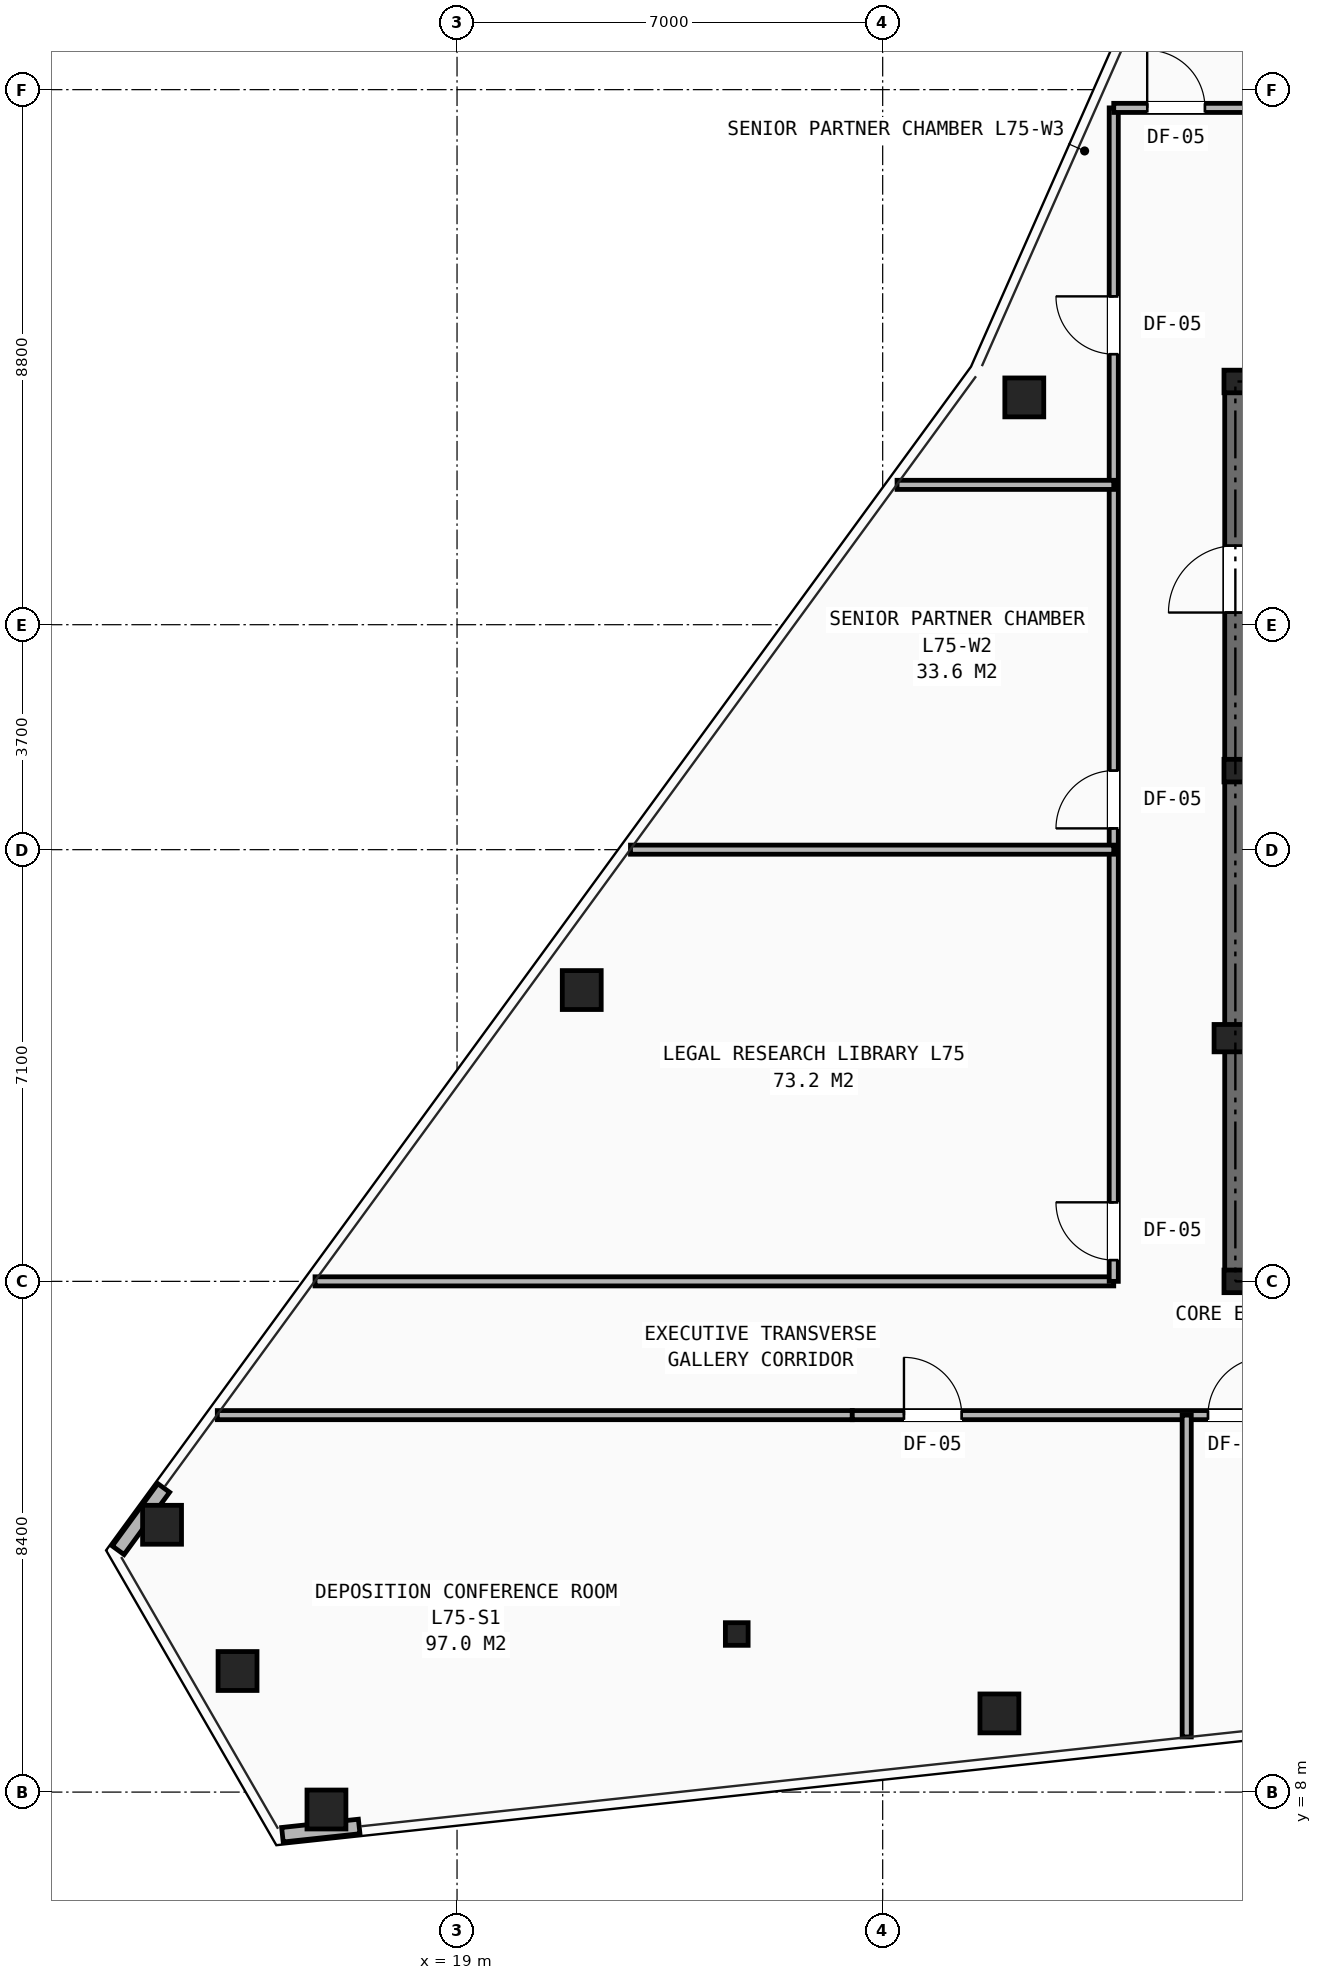
"""IFC4 building model, lengths in metres.
Left out: names, types, materials, properties, quantities, classifications, styles, units other than length and angle.
Written with IfcOpenShell. Run it as: python <this file> out.ifc"""

import sys

from ifc_helpers import new_model, si_unit, direction, frame, frame_2d, origin, origin_2d, place, context, subcontext, project, spatial, rectangle, hollow_rectangle, i_section, extrude, element, fill, save


model = new_model("IFC4")
c1 = context("Model", 3, precision=1e-05, world=origin(), true_north=direction((0.0, 1.0)))
c2 = subcontext(c1, "Body", "Model", "MODEL_VIEW")
j1 = project(units=[si_unit("LENGTHUNIT", "METRE"), si_unit("PLANEANGLEUNIT", "RADIAN")], contexts=[c1])
p1 = place(None, origin())
s1 = spatial("IfcSite", under=j1, at=p1, CompositionType="ELEMENT")
p2 = place(p1, origin())
s2 = spatial("IfcBuilding", under=s1, at=p2, CompositionType="ELEMENT")
p3 = place(p2, frame((0.0, 0.0, 265.5)))
s3 = spatial("IfcBuildingStorey", under=s2, at=p3, CompositionType="ELEMENT", Elevation=265.5)
for number, where, z_axis, x_axis in (
    (1, (31.8, 16.4, 0.0), (0.0, 0.0, 1.0), (1.0, 0.0, 0.0)),
    (2, (31.8, 24.8, 0.0), (0.0, 0.0, 1.0), (1.0, 0.0, 0.0)),
    (3, (31.8, 31.2, 0.0), (0.0, 0.0, 1.0), (1.0, 0.0, 0.0)),
    (4, (23.6, 10.6, 0.0), (0.0, 0.0, 1.0), (1.0, 0.0, 0.0)),
):
    element("IfcColumn", number, at=place(p3, frame(where, z_axis=z_axis, x_axis=x_axis)), inside=s3, PredefinedType="COLUMN", context=c2, shape_type="SweptSolid", body=[
        extrude(i_section(OverallWidth=0.374, OverallDepth=0.372, WebThickness=0.016, FlangeThickness=0.026, at=origin_2d()), origin(), (0.0, 0.0, 1.0), 3.5),
    ])
p4 = place(p3, frame((31.8, 20.4, 0.0), z_axis=(0.0, 0.0, 1.0), x_axis=(1.0, 0.0, 0.0)))
e5 = element("IfcColumn", 5, at=p4, inside=s3, PredefinedType="PILASTER", context=c2, shape_type="SweptSolid", body=[
    extrude(rectangle(XDim=0.7, YDim=0.45, at=origin_2d()), origin(), (0.0, 0.0, 1.0), 3.5),
])
for number, where, z_axis, x_axis in (
    (6, (28.329, 30.938, 0.0), (0.0, 0.0, 1.0), (1.0, 0.0, 0.0)),
    (7, (21.051, 21.191, 0.0), (0.0, 0.0, 1.0), (1.0, 0.0, 0.0)),
    (8, (14.149, 12.397, 0.0), (0.0, 0.0, 1.0), (1.0, 0.0, 0.0)),
    (9, (15.39, 9.991, 0.0), (0.0, 0.0, 1.0), (1.0, 0.0, 0.0)),
    (10, (16.852, 7.714, 0.0), (0.0, 0.0, 1.0), (1.0, 0.0, 0.0)),
    (11, (27.92, 9.294, 0.0), (0.0, 0.0, 1.0), (1.0, 0.0, 0.0)),
):
    element("IfcColumn", number, at=place(p3, frame(where, z_axis=z_axis, x_axis=x_axis)), inside=s3, PredefinedType="COLUMN", context=c2, shape_type="SweptSolid", body=[
        extrude(hollow_rectangle(XDim=0.64, YDim=0.64, WallThickness=0.045, at=origin_2d()), origin(), (0.0, 0.0, 1.0), 3.5),
    ])
for number, where, z_axis, x_axis in (
    (12, (14.176, 13.002, 0.0), (0.0, 0.0, 1.0), (-0.59, -0.807, 0.0)),
    (13, (16.128, 7.298, 0.0), (0.0, 0.0, 1.0), (0.994, 0.107, 0.0)),
):
    element("IfcWall", number, at=place(p3, frame(where, z_axis=z_axis, x_axis=x_axis)), inside=s3, PredefinedType="SHEAR", context=c2, shape_type="SweptSolid", body=[
        extrude(rectangle(XDim=1.269, YDim=0.24, at=frame_2d((0.635, 0.0))), origin(), (0.0, 0.0, 1.0), 2.623),
    ])
p5 = place(p3, frame((31.8, 16.4, 0.0), z_axis=(0.0, 0.0, 1.0), x_axis=(1.0, 0.0, 0.0)))
e14 = element("IfcWall", 14, at=p5, inside=s3, PredefinedType="SHEAR", context=c2, shape_type="SweptSolid", body=[
    extrude(rectangle(XDim=16.4, YDim=0.35, at=frame_2d((8.2, 0.0))), origin(), (0.0, 0.0, 1.0), 3.25),
])
p6 = place(p5, frame((4.2, 0.0, 0.0)))
e15 = element("IfcOpeningElement", 15, at=p6, cuts=e14, PredefinedType="OPENING", context=c2, shape_type="SweptSolid", body=[
    extrude(rectangle(XDim=0.95, YDim=2.1, at=frame_2d((0.475, 1.05))), frame((0.0, 0.185, 0.0), z_axis=(0.0, -1.0, 0.0), x_axis=(1.0, 0.0, 0.0)), (0.0, 0.0, 1.0), 0.37),
])
p7 = place(p5, frame((10.6, 0.0, 0.0)))
e16 = element("IfcOpeningElement", 16, at=p7, cuts=e14, PredefinedType="OPENING", context=c2, shape_type="SweptSolid", body=[
    extrude(rectangle(XDim=0.95, YDim=2.1, at=frame_2d((0.475, 1.05))), frame((0.0, 0.185, 0.0), z_axis=(0.0, -1.0, 0.0), x_axis=(1.0, 0.0, 0.0)), (0.0, 0.0, 1.0), 0.37),
])
p8 = place(p3, frame((31.8, 31.2, 0.0), z_axis=(0.0, 0.0, 1.0), x_axis=(1.0, 0.0, 0.0)))
e17 = element("IfcWall", 17, at=p8, inside=s3, PredefinedType="SHEAR", context=c2, shape_type="SweptSolid", body=[
    extrude(rectangle(XDim=16.4, YDim=0.35, at=frame_2d((8.2, 0.0))), origin(), (0.0, 0.0, 1.0), 3.25),
])
p9 = place(p3, frame((31.8, 16.4, 0.0), z_axis=(0.0, 0.0, 1.0), x_axis=(0.0, 1.0, 0.0)))
e18 = element("IfcWall", 18, at=p9, inside=s3, PredefinedType="SHEAR", context=c2, shape_type="SweptSolid", body=[
    extrude(rectangle(XDim=14.8, YDim=0.35, at=frame_2d((7.4, 0.0))), origin(), (0.0, 0.0, 1.0), 3.25),
])
p10 = place(p9, frame((11.0, 0.0, 0.0)))
e19 = element("IfcOpeningElement", 19, at=p10, cuts=e18, PredefinedType="OPENING", context=c2, shape_type="SweptSolid", body=[
    extrude(rectangle(XDim=1.1, YDim=2.15, at=frame_2d((0.55, 1.075))), frame((0.0, 0.185, 0.0), z_axis=(0.0, -1.0, 0.0), x_axis=(1.0, 0.0, 0.0)), (0.0, 0.0, 1.0), 0.37),
])
p11 = place(p3, frame((31.8, 24.755, 0.0), z_axis=(0.0, 0.0, 1.0), x_axis=(1.0, 0.0, 0.0)))
e20 = element("IfcWall", 20, at=p11, inside=s3, PredefinedType="SHEAR", context=c2, shape_type="SweptSolid", body=[
    extrude(rectangle(XDim=3.245, YDim=0.25, at=frame_2d((1.623, 0.0))), origin(), (0.0, 0.0, 1.0), 3.25),
])
p12 = place(p3, frame((15.057, 14.2, 0.0), z_axis=(0.0, 0.0, 1.0), x_axis=(1.0, 0.0, 0.0)))
e21 = element("IfcWall", 21, at=p12, inside=s3, PredefinedType="PARTITIONING", context=c2, shape_type="SweptSolid", body=[
    extrude(rectangle(XDim=10.443, YDim=0.15, at=frame_2d((5.221, 0.0))), origin(), (0.0, 0.0, 1.0), 2.292),
])
p13 = place(p3, frame((16.665, 16.4, 0.0), z_axis=(0.0, 0.0, 1.0), x_axis=(1.0, 0.0, 0.0)))
e22 = element("IfcWall", 22, at=p13, inside=s3, PredefinedType="PARTITIONING", context=c2, shape_type="SweptSolid", body=[
    extrude(rectangle(XDim=13.135, YDim=0.15, at=frame_2d((6.568, 0.0))), origin(), (0.0, 0.0, 1.0), 2.292),
])
p14 = place(p3, frame((29.8, 16.4, 0.0), z_axis=(0.0, 0.0, 1.0), x_axis=(0.0, 1.0, 0.0)))
e23 = element("IfcWall", 23, at=p14, inside=s3, PredefinedType="PARTITIONING", context=c2, shape_type="SweptSolid", body=[
    extrude(rectangle(XDim=19.3, YDim=0.15, at=frame_2d((9.65, 0.0))), origin(), (0.0, 0.0, 1.0), 2.292),
])
p15 = place(p14, frame((0.35, 0.0, 0.0)))
e24 = element("IfcOpeningElement", 24, at=p15, cuts=e23, PredefinedType="OPENING", context=c2, shape_type="SweptSolid", body=[
    extrude(rectangle(XDim=0.95, YDim=2.1, at=frame_2d((0.475, 1.05))), frame((0.0, 0.085, 0.0), z_axis=(0.0, -1.0, 0.0), x_axis=(1.0, 0.0, 0.0)), (0.0, 0.0, 1.0), 0.17),
])
p16 = place(p14, frame((7.45, 0.0, 0.0)))
e25 = element("IfcOpeningElement", 25, at=p16, cuts=e23, PredefinedType="OPENING", context=c2, shape_type="SweptSolid", body=[
    extrude(rectangle(XDim=0.95, YDim=2.1, at=frame_2d((0.475, 1.05))), frame((0.0, 0.085, 0.0), z_axis=(0.0, -1.0, 0.0), x_axis=(1.0, 0.0, 0.0)), (0.0, 0.0, 1.0), 0.17),
])
p17 = place(p14, frame((15.25, 0.0, 0.0)))
e26 = element("IfcOpeningElement", 26, at=p17, cuts=e23, PredefinedType="OPENING", context=c2, shape_type="SweptSolid", body=[
    extrude(rectangle(XDim=0.95, YDim=2.1, at=frame_2d((0.475, 1.05))), frame((0.0, 0.085, 0.0), z_axis=(0.0, -1.0, 0.0), x_axis=(1.0, 0.0, 0.0)), (0.0, 0.0, 1.0), 0.17),
])
p18 = place(p3, frame((29.8, 35.7, 0.0), z_axis=(0.0, 0.0, 1.0), x_axis=(1.0, 0.0, 0.0)))
e27 = element("IfcWall", 27, at=p18, inside=s3, PredefinedType="PARTITIONING", context=c2, shape_type="SweptSolid", body=[
    extrude(rectangle(XDim=9.45, YDim=0.15, at=frame_2d((4.725, 0.0))), origin(), (0.0, 0.0, 1.0), 2.628),
])
p19 = place(p18, frame((0.55, 0.0, 0.0)))
e28 = element("IfcOpeningElement", 28, at=p19, cuts=e27, PredefinedType="OPENING", context=c2, shape_type="SweptSolid", body=[
    extrude(rectangle(XDim=0.95, YDim=2.1, at=frame_2d((0.475, 1.05))), frame((0.0, 0.085, 0.0), z_axis=(0.0, -1.0, 0.0), x_axis=(1.0, 0.0, 0.0)), (0.0, 0.0, 1.0), 0.17),
])
p20 = place(p18, frame((5.35, 0.0, 0.0)))
e29 = element("IfcOpeningElement", 29, at=p20, cuts=e27, PredefinedType="OPENING", context=c2, shape_type="SweptSolid", body=[
    extrude(rectangle(XDim=0.95, YDim=2.1, at=frame_2d((0.475, 1.05))), frame((0.0, 0.085, 0.0), z_axis=(0.0, -1.0, 0.0), x_axis=(1.0, 0.0, 0.0)), (0.0, 0.0, 1.0), 0.17),
])
p21 = place(p3, frame((25.5, 14.2, 0.0), z_axis=(0.0, 0.0, 1.0), x_axis=(1.0, 0.0, 0.0)))
e30 = element("IfcWall", 30, at=p21, inside=s3, PredefinedType="PARTITIONING", context=c2, shape_type="SweptSolid", body=[
    extrude(rectangle(XDim=29.0, YDim=0.15, at=frame_2d((14.5, 0.0))), origin(), (0.0, 0.0, 1.0), 2.292),
])
p22 = place(p21, frame((0.85, 0.0, 0.0)))
e31 = element("IfcOpeningElement", 31, at=p22, cuts=e30, PredefinedType="OPENING", context=c2, shape_type="SweptSolid", body=[
    extrude(rectangle(XDim=0.95, YDim=2.1, at=frame_2d((0.475, 1.05))), frame((0.0, 0.085, 0.0), z_axis=(0.0, -1.0, 0.0), x_axis=(1.0, 0.0, 0.0)), (0.0, 0.0, 1.0), 0.17),
])
p23 = place(p21, frame((5.85, 0.0, 0.0)))
e32 = element("IfcOpeningElement", 32, at=p23, cuts=e30, PredefinedType="OPENING", context=c2, shape_type="SweptSolid", body=[
    extrude(rectangle(XDim=0.95, YDim=2.1, at=frame_2d((0.475, 1.05))), frame((0.0, 0.085, 0.0), z_axis=(0.0, -1.0, 0.0), x_axis=(1.0, 0.0, 0.0)), (0.0, 0.0, 1.0), 0.17),
])
p24 = place(p21, frame((23.85, 0.0, 0.0)))
e33 = element("IfcOpeningElement", 33, at=p24, cuts=e30, PredefinedType="OPENING", context=c2, shape_type="SweptSolid", body=[
    extrude(rectangle(XDim=0.95, YDim=2.1, at=frame_2d((0.475, 1.05))), frame((0.0, 0.085, 0.0), z_axis=(0.0, -1.0, 0.0), x_axis=(1.0, 0.0, 0.0)), (0.0, 0.0, 1.0), 0.17),
])
p25 = place(p3, frame((31.0, 8.907, 0.0), z_axis=(0.0, 0.0, 1.0), x_axis=(0.0, 1.0, 0.0)))
e34 = element("IfcWall", 34, at=p25, inside=s3, PredefinedType="PARTITIONING", context=c2, shape_type="SweptSolid", body=[
    extrude(rectangle(XDim=5.293, YDim=0.15, at=frame_2d((2.646, 0.0))), origin(), (0.0, 0.0, 1.0), 2.628),
])
p26 = place(p3, frame((21.852, 23.5, 0.0), z_axis=(0.0, 0.0, 1.0), x_axis=(1.0, 0.0, 0.0)))
e35 = element("IfcWall", 35, at=p26, inside=s3, PredefinedType="PARTITIONING", context=c2, shape_type="SweptSolid", body=[
    extrude(rectangle(XDim=7.948, YDim=0.15, at=frame_2d((3.974, 0.0))), origin(), (0.0, 0.0, 1.0), 2.628),
])
p27 = place(p3, frame((26.236, 29.5, 0.0), z_axis=(0.0, 0.0, 1.0), x_axis=(1.0, 0.0, 0.0)))
e36 = element("IfcWall", 36, at=p27, inside=s3, PredefinedType="PARTITIONING", context=c2, shape_type="SweptSolid", body=[
    extrude(rectangle(XDim=3.564, YDim=0.15, at=frame_2d((1.782, 0.0))), origin(), (0.0, 0.0, 1.0), 2.628),
])
p28 = place(p10, origin())
e37 = element("IfcDoor", 37, at=p28, inside=s3, OperationType="SINGLE_SWING_LEFT", PredefinedType="DOOR", context=c2, shape_type="SweptSolid", body=[
    extrude(rectangle(XDim=1.1, YDim=2.15, at=frame_2d((0.55, 1.075))), frame((0.0, 0.025, 0.0), z_axis=(0.0, -1.0, 0.0), x_axis=(1.0, 0.0, 0.0)), (0.0, 0.0, 1.0), 0.05),
])
fill(e19, e37)
p29 = place(p22, origin())
e38 = element("IfcDoor", 38, at=p29, inside=s3, OperationType="SINGLE_SWING_LEFT", PredefinedType="DOOR", context=c2, shape_type="SweptSolid", body=[
    extrude(rectangle(XDim=0.95, YDim=2.1, at=frame_2d((0.475, 1.05))), frame((0.0, 0.025, 0.0), z_axis=(0.0, -1.0, 0.0), x_axis=(1.0, 0.0, 0.0)), (0.0, 0.0, 1.0), 0.05),
])
fill(e31, e38)
p30 = place(p23, origin())
e39 = element("IfcDoor", 39, at=p30, inside=s3, OperationType="SINGLE_SWING_RIGHT", PredefinedType="DOOR", context=c2, shape_type="SweptSolid", body=[
    extrude(rectangle(XDim=0.95, YDim=2.1, at=frame_2d((0.475, 1.05))), frame((0.0, 0.025, 0.0), z_axis=(0.0, -1.0, 0.0), x_axis=(1.0, 0.0, 0.0)), (0.0, 0.0, 1.0), 0.05),
])
fill(e32, e39)
p31 = place(p15, origin())
e40 = element("IfcDoor", 40, at=p31, inside=s3, OperationType="SINGLE_SWING_RIGHT", PredefinedType="DOOR", context=c2, shape_type="SweptSolid", body=[
    extrude(rectangle(XDim=0.95, YDim=2.1, at=frame_2d((0.475, 1.05))), frame((0.0, 0.025, 0.0), z_axis=(0.0, -1.0, 0.0), x_axis=(1.0, 0.0, 0.0)), (0.0, 0.0, 1.0), 0.05),
])
fill(e24, e40)
p32 = place(p16, origin())
e41 = element("IfcDoor", 41, at=p32, inside=s3, OperationType="SINGLE_SWING_LEFT", PredefinedType="DOOR", context=c2, shape_type="SweptSolid", body=[
    extrude(rectangle(XDim=0.95, YDim=2.1, at=frame_2d((0.475, 1.05))), frame((0.0, 0.025, 0.0), z_axis=(0.0, -1.0, 0.0), x_axis=(1.0, 0.0, 0.0)), (0.0, 0.0, 1.0), 0.05),
])
fill(e25, e41)
p33 = place(p17, origin())
e42 = element("IfcDoor", 42, at=p33, inside=s3, OperationType="SINGLE_SWING_RIGHT", PredefinedType="DOOR", context=c2, shape_type="SweptSolid", body=[
    extrude(rectangle(XDim=0.95, YDim=2.1, at=frame_2d((0.475, 1.05))), frame((0.0, 0.025, 0.0), z_axis=(0.0, -1.0, 0.0), x_axis=(1.0, 0.0, 0.0)), (0.0, 0.0, 1.0), 0.05),
])
fill(e26, e42)
p34 = place(p19, origin())
e43 = element("IfcDoor", 43, at=p34, inside=s3, OperationType="SINGLE_SWING_LEFT", PredefinedType="DOOR", context=c2, shape_type="SweptSolid", body=[
    extrude(rectangle(XDim=0.95, YDim=2.1, at=frame_2d((0.475, 1.05))), frame((0.0, 0.025, 0.0), z_axis=(0.0, -1.0, 0.0), x_axis=(1.0, 0.0, 0.0)), (0.0, 0.0, 1.0), 0.05),
])
fill(e28, e43)
save(model, sys.argv[1])
